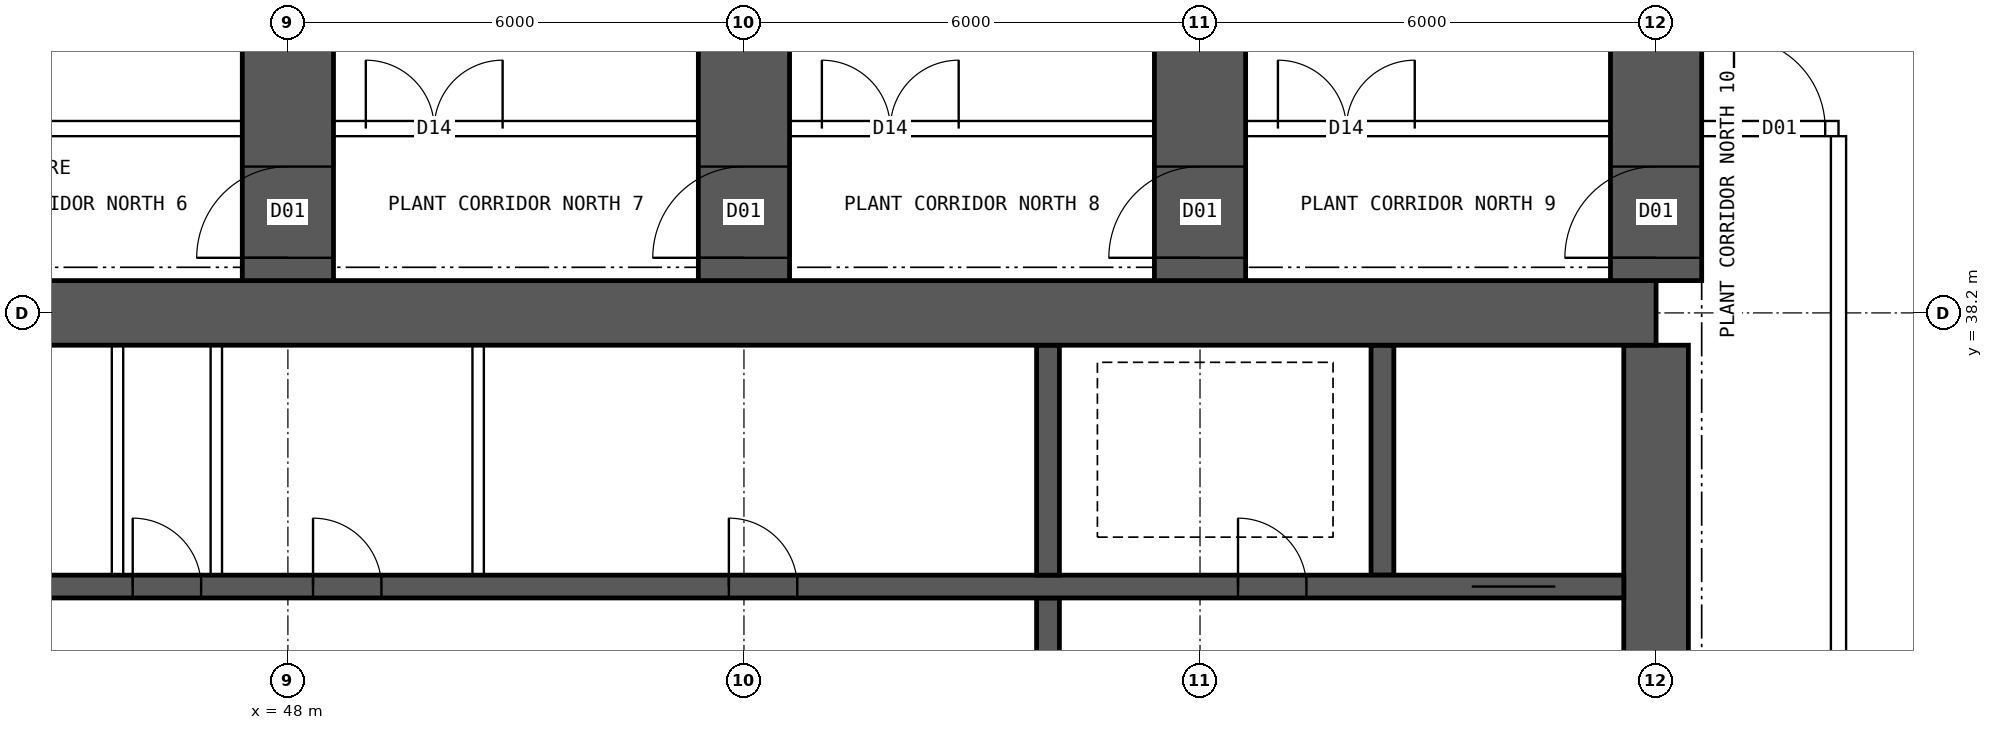
"""IFC4 building model, lengths in metres.
Left out: names, types, materials, properties, quantities, classifications, styles, units other than length and angle.
Written with IfcOpenShell. Run it as: python <this file> out.ifc"""

import sys

from ifc_helpers import new_model, si_unit, direction, frame, frame_2d, origin, place, context, subcontext, project, spatial, rectangle, extrude, element, fill, save


model = new_model("IFC4")
c1 = context("Model", 3, precision=1e-05, world=origin(), true_north=direction((0.0, 1.0)))
c2 = subcontext(c1, "Body", "Model", "MODEL_VIEW")
j1 = project(units=[si_unit("LENGTHUNIT", "METRE"), si_unit("PLANEANGLEUNIT", "RADIAN")], contexts=[c1])
p1 = place(None, origin())
s1 = spatial("IfcSite", under=j1, at=p1, CompositionType="ELEMENT")
p2 = place(p1, origin())
s2 = spatial("IfcBuilding", under=s1, at=p2, CompositionType="ELEMENT")
p3 = place(p2, frame((0.0, 0.0, 201.1)))
s3 = spatial("IfcBuildingStorey", under=s2, at=p3, CompositionType="ELEMENT", Elevation=201.1)
p4 = place(p3, frame((18.0, 38.2, 0.0), z_axis=(0.0, 0.0, 1.0), x_axis=(1.0, 0.0, 0.0)))
e1 = element("IfcWall", 1, at=p4, inside=s3, PredefinedType="SHEAR", context=c2, shape_type="SweptSolid", body=[
    extrude(rectangle(XDim=48.0, YDim=0.85, at=frame_2d((24.0, 0.0))), origin(), (0.0, 0.0, 1.0), 7.2),
])
p5 = place(p3, frame((66.0, 26.225, 0.0), z_axis=(0.0, 0.0, 1.0), x_axis=(0.0, 1.0, 0.0)))
e2 = element("IfcWall", 2, at=p5, inside=s3, PredefinedType="SHEAR", context=c2, shape_type="SweptSolid", body=[
    extrude(rectangle(XDim=11.55, YDim=0.85, at=frame_2d((5.775, 0.0))), origin(), (0.0, 0.0, 1.0), 7.2),
])
p6 = place(p5, frame((5.075, 0.0, 0.0)))
e3 = element("IfcOpeningElement", 3, at=p6, cuts=e2, PredefinedType="OPENING", context=c2, shape_type="SweptSolid", body=[
    extrude(rectangle(XDim=1.2, YDim=2.1, at=frame_2d((0.6, 1.05))), frame((0.0, 0.435, 0.0), z_axis=(0.0, -1.0, 0.0), x_axis=(1.0, 0.0, 0.0)), (0.0, 0.0, 1.0), 0.87),
])
p7 = place(p3, frame((18.425, 34.6, 0.0), z_axis=(0.0, 0.0, 1.0), x_axis=(1.0, 0.0, 0.0)))
e4 = element("IfcWall", 4, at=p7, inside=s3, PredefinedType="SHEAR", context=c2, shape_type="SweptSolid", body=[
    extrude(rectangle(XDim=47.15, YDim=0.3, at=frame_2d((23.575, 0.0))), origin(), (0.0, 0.0, 1.0), 7.2),
])
p8 = place(p7, frame((0.9, 0.0, 0.0)))
e5 = element("IfcOpeningElement", 5, at=p8, cuts=e4, PredefinedType="OPENING", context=c2, shape_type="SweptSolid", body=[
    extrude(rectangle(XDim=1.1, YDim=2.1, at=frame_2d((0.55, 1.05))), frame((0.0, 0.16, 0.0), z_axis=(0.0, -1.0, 0.0), x_axis=(1.0, 0.0, 0.0)), (0.0, 0.0, 1.0), 0.32),
])
p9 = place(p7, frame((45.15, 0.0, 0.0)))
e6 = element("IfcOpeningElement", 6, at=p9, cuts=e4, PredefinedType="OPENING", context=c2, shape_type="SweptSolid", body=[
    extrude(rectangle(XDim=1.1, YDim=2.1, at=frame_2d((0.55, 1.05))), frame((0.0, 0.16, 0.0), z_axis=(0.0, -1.0, 0.0), x_axis=(1.0, 0.0, 0.0)), (0.0, 0.0, 1.0), 0.32),
])
p10 = place(p7, frame((4.175, 0.0, 0.0)))
e7 = element("IfcOpeningElement", 7, at=p10, cuts=e4, PredefinedType="OPENING", context=c2, shape_type="SweptSolid", body=[
    extrude(rectangle(XDim=0.9, YDim=2.1, at=frame_2d((0.45, 1.05))), frame((0.0, 0.16, 0.0), z_axis=(0.0, -1.0, 0.0), x_axis=(1.0, 0.0, 0.0)), (0.0, 0.0, 1.0), 0.32),
])
p11 = place(p7, frame((42.075, 0.0, 0.0)))
e8 = element("IfcOpeningElement", 8, at=p11, cuts=e4, PredefinedType="OPENING", context=c2, shape_type="SweptSolid", body=[
    extrude(rectangle(XDim=0.9, YDim=2.1, at=frame_2d((0.45, 1.05))), frame((0.0, 0.16, 0.0), z_axis=(0.0, -1.0, 0.0), x_axis=(1.0, 0.0, 0.0)), (0.0, 0.0, 1.0), 0.32),
])
p12 = place(p7, frame((8.95, 0.0, 0.0)))
e9 = element("IfcOpeningElement", 9, at=p12, cuts=e4, PredefinedType="OPENING", context=c2, shape_type="SweptSolid", body=[
    extrude(rectangle(XDim=0.9, YDim=2.1, at=frame_2d((0.45, 1.05))), frame((0.0, 0.16, 0.0), z_axis=(0.0, -1.0, 0.0), x_axis=(1.0, 0.0, 0.0)), (0.0, 0.0, 1.0), 0.32),
])
p13 = place(p7, frame((12.924, 0.0, 0.0)))
e10 = element("IfcOpeningElement", 10, at=p13, cuts=e4, PredefinedType="OPENING", context=c2, shape_type="SweptSolid", body=[
    extrude(rectangle(XDim=0.9, YDim=2.1, at=frame_2d((0.45, 1.05))), frame((0.0, 0.16, 0.0), z_axis=(0.0, -1.0, 0.0), x_axis=(1.0, 0.0, 0.0)), (0.0, 0.0, 1.0), 0.32),
])
p14 = place(p7, frame((16.571, 0.0, 0.0)))
e11 = element("IfcOpeningElement", 11, at=p14, cuts=e4, PredefinedType="OPENING", context=c2, shape_type="SweptSolid", body=[
    extrude(rectangle(XDim=0.9, YDim=2.1, at=frame_2d((0.45, 1.05))), frame((0.0, 0.16, 0.0), z_axis=(0.0, -1.0, 0.0), x_axis=(1.0, 0.0, 0.0)), (0.0, 0.0, 1.0), 0.32),
])
p15 = place(p7, frame((20.33, 0.0, 0.0)))
e12 = element("IfcOpeningElement", 12, at=p15, cuts=e4, PredefinedType="OPENING", context=c2, shape_type="SweptSolid", body=[
    extrude(rectangle(XDim=0.9, YDim=2.1, at=frame_2d((0.45, 1.05))), frame((0.0, 0.16, 0.0), z_axis=(0.0, -1.0, 0.0), x_axis=(1.0, 0.0, 0.0)), (0.0, 0.0, 1.0), 0.32),
])
p16 = place(p7, frame((24.736, 0.0, 0.0)))
e13 = element("IfcOpeningElement", 13, at=p16, cuts=e4, PredefinedType="OPENING", context=c2, shape_type="SweptSolid", body=[
    extrude(rectangle(XDim=0.9, YDim=2.1, at=frame_2d((0.45, 1.05))), frame((0.0, 0.16, 0.0), z_axis=(0.0, -1.0, 0.0), x_axis=(1.0, 0.0, 0.0)), (0.0, 0.0, 1.0), 0.32),
])
p17 = place(p7, frame((27.533, 0.0, 0.0)))
e14 = element("IfcOpeningElement", 14, at=p17, cuts=e4, PredefinedType="OPENING", context=c2, shape_type="SweptSolid", body=[
    extrude(rectangle(XDim=0.9, YDim=2.1, at=frame_2d((0.45, 1.05))), frame((0.0, 0.16, 0.0), z_axis=(0.0, -1.0, 0.0), x_axis=(1.0, 0.0, 0.0)), (0.0, 0.0, 1.0), 0.32),
])
p18 = place(p7, frame((29.906, 0.0, 0.0)))
e15 = element("IfcOpeningElement", 15, at=p18, cuts=e4, PredefinedType="OPENING", context=c2, shape_type="SweptSolid", body=[
    extrude(rectangle(XDim=0.9, YDim=2.1, at=frame_2d((0.45, 1.05))), frame((0.0, 0.16, 0.0), z_axis=(0.0, -1.0, 0.0), x_axis=(1.0, 0.0, 0.0)), (0.0, 0.0, 1.0), 0.32),
])
p19 = place(p7, frame((35.376, 0.0, 0.0)))
e16 = element("IfcOpeningElement", 16, at=p19, cuts=e4, PredefinedType="OPENING", context=c2, shape_type="SweptSolid", body=[
    extrude(rectangle(XDim=0.9, YDim=2.1, at=frame_2d((0.45, 1.05))), frame((0.0, 0.16, 0.0), z_axis=(0.0, -1.0, 0.0), x_axis=(1.0, 0.0, 0.0)), (0.0, 0.0, 1.0), 0.32),
])
p20 = place(p3, frame((58.0, 30.55, 0.0), z_axis=(0.0, 0.0, 1.0), x_axis=(0.0, 1.0, 0.0)))
e17 = element("IfcWall", 17, at=p20, inside=s3, PredefinedType="SHEAR", context=c2, shape_type="SweptSolid", body=[
    extrude(rectangle(XDim=3.9, YDim=0.3, at=frame_2d((1.95, 0.0))), origin(), (0.0, 0.0, 1.0), 7.2),
])
p21 = place(p20, frame((1.4, 0.0, 0.0)))
e18 = element("IfcOpeningElement", 18, at=p21, cuts=e17, PredefinedType="OPENING", context=c2, shape_type="SweptSolid", body=[
    extrude(rectangle(XDim=1.2, YDim=2.1, at=frame_2d((0.6, 1.05))), frame((0.0, 0.16, 0.0), z_axis=(0.0, -1.0, 0.0), x_axis=(1.0, 0.0, 0.0)), (0.0, 0.0, 1.0), 0.32),
])
for number, where, z_axis, x_axis in (
    (19, (62.4, 34.75, 0.0), (0.0, 0.0, 1.0), (0.0, 1.0, 0.0)),
    (20, (58.0, 34.75, 0.0), (0.0, 0.0, 1.0), (0.0, 1.0, 0.0)),
):
    element("IfcWall", number, at=place(p3, frame(where, z_axis=z_axis, x_axis=x_axis)), inside=s3, PredefinedType="SHEAR", context=c2, shape_type="SweptSolid", body=[
        extrude(rectangle(XDim=3.025, YDim=0.3, at=frame_2d((1.512, 0.0))), origin(), (0.0, 0.0, 1.0), 7.2),
    ])
p22 = place(p3, frame((48.0, 38.625, 0.0), z_axis=(0.0, 0.0, 1.0), x_axis=(0.0, 1.0, 0.0)))
e21 = element("IfcWall", 21, at=p22, inside=s3, PredefinedType="SHEAR", context=c2, shape_type="SweptSolid", body=[
    extrude(rectangle(XDim=15.375, YDim=1.2, at=frame_2d((7.688, 0.0))), origin(), (0.0, 0.0, 1.0), 7.2),
])
p23 = place(p22, frame((0.3, 0.0, 0.0)))
e22 = element("IfcOpeningElement", 22, at=p23, cuts=e21, PredefinedType="OPENING", context=c2, shape_type="SweptSolid", body=[
    extrude(rectangle(XDim=1.2, YDim=2.1, at=frame_2d((0.6, 1.05))), frame((0.0, 0.61, 0.0), z_axis=(0.0, -1.0, 0.0), x_axis=(1.0, 0.0, 0.0)), (0.0, 0.0, 1.0), 1.22),
])
p24 = place(p3, frame((54.0, 38.625, 0.0), z_axis=(0.0, 0.0, 1.0), x_axis=(0.0, 1.0, 0.0)))
e23 = element("IfcWall", 23, at=p24, inside=s3, PredefinedType="SHEAR", context=c2, shape_type="SweptSolid", body=[
    extrude(rectangle(XDim=15.375, YDim=1.2, at=frame_2d((7.688, 0.0))), origin(), (0.0, 0.0, 1.0), 7.2),
])
p25 = place(p24, frame((0.3, 0.0, 0.0)))
e24 = element("IfcOpeningElement", 24, at=p25, cuts=e23, PredefinedType="OPENING", context=c2, shape_type="SweptSolid", body=[
    extrude(rectangle(XDim=1.2, YDim=2.1, at=frame_2d((0.6, 1.05))), frame((0.0, 0.61, 0.0), z_axis=(0.0, -1.0, 0.0), x_axis=(1.0, 0.0, 0.0)), (0.0, 0.0, 1.0), 1.22),
])
p26 = place(p3, frame((60.0, 38.625, 0.0), z_axis=(0.0, 0.0, 1.0), x_axis=(0.0, 1.0, 0.0)))
e25 = element("IfcWall", 25, at=p26, inside=s3, PredefinedType="SHEAR", context=c2, shape_type="SweptSolid", body=[
    extrude(rectangle(XDim=15.375, YDim=1.2, at=frame_2d((7.688, 0.0))), origin(), (0.0, 0.0, 1.0), 7.2),
])
p27 = place(p26, frame((0.3, 0.0, 0.0)))
e26 = element("IfcOpeningElement", 26, at=p27, cuts=e25, PredefinedType="OPENING", context=c2, shape_type="SweptSolid", body=[
    extrude(rectangle(XDim=1.2, YDim=2.1, at=frame_2d((0.6, 1.05))), frame((0.0, 0.61, 0.0), z_axis=(0.0, -1.0, 0.0), x_axis=(1.0, 0.0, 0.0)), (0.0, 0.0, 1.0), 1.22),
])
p28 = place(p3, frame((66.0, 38.625, 0.0), z_axis=(0.0, 0.0, 1.0), x_axis=(0.0, 1.0, 0.0)))
e27 = element("IfcWall", 27, at=p28, inside=s3, PredefinedType="SHEAR", context=c2, shape_type="SweptSolid", body=[
    extrude(rectangle(XDim=15.375, YDim=1.2, at=frame_2d((7.688, 0.0))), origin(), (0.0, 0.0, 1.0), 7.2),
])
p29 = place(p28, frame((0.3, 0.0, 0.0)))
e28 = element("IfcOpeningElement", 28, at=p29, cuts=e27, PredefinedType="OPENING", context=c2, shape_type="SweptSolid", body=[
    extrude(rectangle(XDim=1.2, YDim=2.1, at=frame_2d((0.6, 1.05))), frame((0.0, 0.61, 0.0), z_axis=(0.0, -1.0, 0.0), x_axis=(1.0, 0.0, 0.0)), (0.0, 0.0, 1.0), 1.22),
])
p30 = place(p28, frame((10.225, 0.0, 0.0)))
e29 = element("IfcOpeningElement", 29, at=p30, cuts=e27, PredefinedType="OPENING", context=c2, shape_type="SweptSolid", body=[
    extrude(rectangle(XDim=1.2, YDim=2.1, at=frame_2d((0.6, 1.05))), frame((0.0, 0.61, 0.0), z_axis=(0.0, -1.0, 0.0), x_axis=(1.0, 0.0, 0.0)), (0.0, 0.0, 1.0), 1.22),
])
for number, where, z_axis, x_axis in (
    (30, (45.758, 34.75, 0.0), (0.0, 0.0, 1.0), (0.0, 1.0, 0.0)),
    (31, (47.058, 34.75, 0.0), (0.0, 0.0, 1.0), (0.0, 1.0, 0.0)),
    (32, (50.503, 34.75, 0.0), (0.0, 0.0, 1.0), (0.0, 1.0, 0.0)),
):
    element("IfcWall", number, at=place(p3, frame(where, z_axis=z_axis, x_axis=x_axis)), inside=s3, PredefinedType="SOLIDWALL", context=c2, shape_type="SweptSolid", body=[
        extrude(rectangle(XDim=3.025, YDim=0.15, at=frame_2d((1.512, 0.0))), origin(), (0.0, 0.0, 1.0), 6.9),
    ])
p31 = place(p3, frame((15.6, 40.625, 0.0), z_axis=(0.0, 0.0, 1.0), x_axis=(1.0, 0.0, 0.0)))
e33 = element("IfcWall", 33, at=p31, inside=s3, PredefinedType="SOLIDWALL", context=c2, shape_type="SweptSolid", body=[
    extrude(rectangle(XDim=52.8, YDim=0.2, at=frame_2d((26.4, 0.0))), origin(), (0.0, 0.0, 1.0), 6.9),
])
p32 = place(p31, frame((0.6, 0.0, 0.0)))
e34 = element("IfcOpeningElement", 34, at=p32, cuts=e33, PredefinedType="OPENING", context=c2, shape_type="SweptSolid", body=[
    extrude(rectangle(XDim=1.2, YDim=2.1, at=frame_2d((0.6, 1.05))), frame((0.0, 0.11, 0.0), z_axis=(0.0, -1.0, 0.0), x_axis=(1.0, 0.0, 0.0)), (0.0, 0.0, 1.0), 0.22),
])
p33 = place(p31, frame((3.425, 0.0, 0.0)))
e35 = element("IfcOpeningElement", 35, at=p33, cuts=e33, PredefinedType="OPENING", context=c2, shape_type="SweptSolid", body=[
    extrude(rectangle(XDim=1.8, YDim=2.4, at=frame_2d((0.9, 1.2))), frame((0.0, 0.11, 0.0), z_axis=(0.0, -1.0, 0.0), x_axis=(1.0, 0.0, 0.0)), (0.0, 0.0, 1.0), 0.22),
])
p34 = place(p31, frame((9.425, 0.0, 0.0)))
e36 = element("IfcOpeningElement", 36, at=p34, cuts=e33, PredefinedType="OPENING", context=c2, shape_type="SweptSolid", body=[
    extrude(rectangle(XDim=1.8, YDim=2.4, at=frame_2d((0.9, 1.2))), frame((0.0, 0.11, 0.0), z_axis=(0.0, -1.0, 0.0), x_axis=(1.0, 0.0, 0.0)), (0.0, 0.0, 1.0), 0.22),
])
p35 = place(p31, frame((15.425, 0.0, 0.0)))
e37 = element("IfcOpeningElement", 37, at=p35, cuts=e33, PredefinedType="OPENING", context=c2, shape_type="SweptSolid", body=[
    extrude(rectangle(XDim=1.8, YDim=2.4, at=frame_2d((0.9, 1.2))), frame((0.0, 0.11, 0.0), z_axis=(0.0, -1.0, 0.0), x_axis=(1.0, 0.0, 0.0)), (0.0, 0.0, 1.0), 0.22),
])
p36 = place(p31, frame((21.425, 0.0, 0.0)))
e38 = element("IfcOpeningElement", 38, at=p36, cuts=e33, PredefinedType="OPENING", context=c2, shape_type="SweptSolid", body=[
    extrude(rectangle(XDim=1.8, YDim=2.4, at=frame_2d((0.9, 1.2))), frame((0.0, 0.11, 0.0), z_axis=(0.0, -1.0, 0.0), x_axis=(1.0, 0.0, 0.0)), (0.0, 0.0, 1.0), 0.22),
])
p37 = place(p31, frame((27.425, 0.0, 0.0)))
e39 = element("IfcOpeningElement", 39, at=p37, cuts=e33, PredefinedType="OPENING", context=c2, shape_type="SweptSolid", body=[
    extrude(rectangle(XDim=1.8, YDim=2.4, at=frame_2d((0.9, 1.2))), frame((0.0, 0.11, 0.0), z_axis=(0.0, -1.0, 0.0), x_axis=(1.0, 0.0, 0.0)), (0.0, 0.0, 1.0), 0.22),
])
p38 = place(p31, frame((33.425, 0.0, 0.0)))
e40 = element("IfcOpeningElement", 40, at=p38, cuts=e33, PredefinedType="OPENING", context=c2, shape_type="SweptSolid", body=[
    extrude(rectangle(XDim=1.8, YDim=2.4, at=frame_2d((0.9, 1.2))), frame((0.0, 0.11, 0.0), z_axis=(0.0, -1.0, 0.0), x_axis=(1.0, 0.0, 0.0)), (0.0, 0.0, 1.0), 0.22),
])
p39 = place(p31, frame((39.425, 0.0, 0.0)))
e41 = element("IfcOpeningElement", 41, at=p39, cuts=e33, PredefinedType="OPENING", context=c2, shape_type="SweptSolid", body=[
    extrude(rectangle(XDim=1.8, YDim=2.4, at=frame_2d((0.9, 1.2))), frame((0.0, 0.11, 0.0), z_axis=(0.0, -1.0, 0.0), x_axis=(1.0, 0.0, 0.0)), (0.0, 0.0, 1.0), 0.22),
])
p40 = place(p31, frame((45.425, 0.0, 0.0)))
e42 = element("IfcOpeningElement", 42, at=p40, cuts=e33, PredefinedType="OPENING", context=c2, shape_type="SweptSolid", body=[
    extrude(rectangle(XDim=1.8, YDim=2.4, at=frame_2d((0.9, 1.2))), frame((0.0, 0.11, 0.0), z_axis=(0.0, -1.0, 0.0), x_axis=(1.0, 0.0, 0.0)), (0.0, 0.0, 1.0), 0.22),
])
p41 = place(p31, frame((51.425, 0.0, 0.0)))
e43 = element("IfcOpeningElement", 43, at=p41, cuts=e33, PredefinedType="OPENING", context=c2, shape_type="SweptSolid", body=[
    extrude(rectangle(XDim=1.2, YDim=2.1, at=frame_2d((0.6, 1.05))), frame((0.0, 0.11, 0.0), z_axis=(0.0, -1.0, 0.0), x_axis=(1.0, 0.0, 0.0)), (0.0, 0.0, 1.0), 0.22),
])
p42 = place(p3, frame((68.4, 23.475, 0.0), z_axis=(0.0, 0.0, 1.0), x_axis=(0.0, 1.0, 0.0)))
e44 = element("IfcWall", 44, at=p42, inside=s3, PredefinedType="SOLIDWALL", context=c2, shape_type="SweptSolid", body=[
    extrude(rectangle(XDim=17.05, YDim=0.2, at=frame_2d((8.525, 0.0))), origin(), (0.0, 0.0, 1.0), 6.9),
])
p43 = place(p9, origin())
e45 = element("IfcDoor", 45, at=p43, inside=s3, OperationType="DOUBLE_DOOR_SLIDING", PredefinedType="DOOR", context=c2, shape_type="SweptSolid", body=[
    extrude(rectangle(XDim=1.1, YDim=2.1, at=frame_2d((0.55, 1.05))), frame((0.0, 0.025, 0.0), z_axis=(0.0, -1.0, 0.0), x_axis=(1.0, 0.0, 0.0)), (0.0, 0.0, 1.0), 0.05),
])
fill(e6, e45)
p44 = place(p11, origin())
e46 = element("IfcDoor", 46, at=p44, inside=s3, OperationType="SINGLE_SWING_LEFT", PredefinedType="DOOR", context=c2, shape_type="SweptSolid", body=[
    extrude(rectangle(XDim=0.9, YDim=2.1, at=frame_2d((0.45, 1.05))), frame((0.0, 0.025, 0.0), z_axis=(0.0, -1.0, 0.0), x_axis=(1.0, 0.0, 0.0)), (0.0, 0.0, 1.0), 0.05),
])
fill(e8, e46)
p45 = place(p17, origin())
e47 = element("IfcDoor", 47, at=p45, inside=s3, OperationType="SINGLE_SWING_LEFT", PredefinedType="DOOR", context=c2, shape_type="SweptSolid", body=[
    extrude(rectangle(XDim=0.9, YDim=2.1, at=frame_2d((0.45, 1.05))), frame((0.0, 0.025, 0.0), z_axis=(0.0, -1.0, 0.0), x_axis=(1.0, 0.0, 0.0)), (0.0, 0.0, 1.0), 0.05),
])
fill(e14, e47)
p46 = place(p18, origin())
e48 = element("IfcDoor", 48, at=p46, inside=s3, OperationType="SINGLE_SWING_LEFT", PredefinedType="DOOR", context=c2, shape_type="SweptSolid", body=[
    extrude(rectangle(XDim=0.9, YDim=2.1, at=frame_2d((0.45, 1.05))), frame((0.0, 0.025, 0.0), z_axis=(0.0, -1.0, 0.0), x_axis=(1.0, 0.0, 0.0)), (0.0, 0.0, 1.0), 0.05),
])
fill(e15, e48)
p47 = place(p19, origin())
e49 = element("IfcDoor", 49, at=p47, inside=s3, OperationType="SINGLE_SWING_LEFT", PredefinedType="DOOR", context=c2, shape_type="SweptSolid", body=[
    extrude(rectangle(XDim=0.9, YDim=2.1, at=frame_2d((0.45, 1.05))), frame((0.0, 0.025, 0.0), z_axis=(0.0, -1.0, 0.0), x_axis=(1.0, 0.0, 0.0)), (0.0, 0.0, 1.0), 0.05),
])
fill(e16, e49)
p48 = place(p38, origin())
e50 = element("IfcDoor", 50, at=p48, inside=s3, OperationType="DOUBLE_DOOR_SINGLE_SWING", PredefinedType="DOOR", context=c2, shape_type="SweptSolid", body=[
    extrude(rectangle(XDim=1.8, YDim=2.4, at=frame_2d((0.9, 1.2))), frame((0.0, 0.025, 0.0), z_axis=(0.0, -1.0, 0.0), x_axis=(1.0, 0.0, 0.0)), (0.0, 0.0, 1.0), 0.05),
])
fill(e40, e50)
p49 = place(p39, origin())
e51 = element("IfcDoor", 51, at=p49, inside=s3, OperationType="DOUBLE_DOOR_SINGLE_SWING", PredefinedType="DOOR", context=c2, shape_type="SweptSolid", body=[
    extrude(rectangle(XDim=1.8, YDim=2.4, at=frame_2d((0.9, 1.2))), frame((0.0, 0.025, 0.0), z_axis=(0.0, -1.0, 0.0), x_axis=(1.0, 0.0, 0.0)), (0.0, 0.0, 1.0), 0.05),
])
fill(e41, e51)
p50 = place(p40, origin())
e52 = element("IfcDoor", 52, at=p50, inside=s3, OperationType="DOUBLE_DOOR_SINGLE_SWING", PredefinedType="DOOR", context=c2, shape_type="SweptSolid", body=[
    extrude(rectangle(XDim=1.8, YDim=2.4, at=frame_2d((0.9, 1.2))), frame((0.0, 0.025, 0.0), z_axis=(0.0, -1.0, 0.0), x_axis=(1.0, 0.0, 0.0)), (0.0, 0.0, 1.0), 0.05),
])
fill(e42, e52)
p51 = place(p41, origin())
e53 = element("IfcDoor", 53, at=p51, inside=s3, OperationType="SINGLE_SWING_LEFT", PredefinedType="DOOR", context=c2, shape_type="SweptSolid", body=[
    extrude(rectangle(XDim=1.2, YDim=2.1, at=frame_2d((0.6, 1.05))), frame((0.0, 0.025, 0.0), z_axis=(0.0, -1.0, 0.0), x_axis=(1.0, 0.0, 0.0)), (0.0, 0.0, 1.0), 0.05),
])
fill(e43, e53)
p52 = place(p23, origin())
e54 = element("IfcDoor", 54, at=p52, inside=s3, OperationType="SINGLE_SWING_LEFT", PredefinedType="DOOR", context=c2, shape_type="SweptSolid", body=[
    extrude(rectangle(XDim=1.2, YDim=2.1, at=frame_2d((0.6, 1.05))), frame((0.0, 0.025, 0.0), z_axis=(0.0, -1.0, 0.0), x_axis=(1.0, 0.0, 0.0)), (0.0, 0.0, 1.0), 0.05),
])
fill(e22, e54)
p53 = place(p25, origin())
e55 = element("IfcDoor", 55, at=p53, inside=s3, OperationType="SINGLE_SWING_LEFT", PredefinedType="DOOR", context=c2, shape_type="SweptSolid", body=[
    extrude(rectangle(XDim=1.2, YDim=2.1, at=frame_2d((0.6, 1.05))), frame((0.0, 0.025, 0.0), z_axis=(0.0, -1.0, 0.0), x_axis=(1.0, 0.0, 0.0)), (0.0, 0.0, 1.0), 0.05),
])
fill(e24, e55)
p54 = place(p27, origin())
e56 = element("IfcDoor", 56, at=p54, inside=s3, OperationType="SINGLE_SWING_LEFT", PredefinedType="DOOR", context=c2, shape_type="SweptSolid", body=[
    extrude(rectangle(XDim=1.2, YDim=2.1, at=frame_2d((0.6, 1.05))), frame((0.0, 0.025, 0.0), z_axis=(0.0, -1.0, 0.0), x_axis=(1.0, 0.0, 0.0)), (0.0, 0.0, 1.0), 0.05),
])
fill(e26, e56)
p55 = place(p29, origin())
e57 = element("IfcDoor", 57, at=p55, inside=s3, OperationType="SINGLE_SWING_LEFT", PredefinedType="DOOR", context=c2, shape_type="SweptSolid", body=[
    extrude(rectangle(XDim=1.2, YDim=2.1, at=frame_2d((0.6, 1.05))), frame((0.0, 0.025, 0.0), z_axis=(0.0, -1.0, 0.0), x_axis=(1.0, 0.0, 0.0)), (0.0, 0.0, 1.0), 0.05),
])
fill(e28, e57)
save(model, sys.argv[1])
